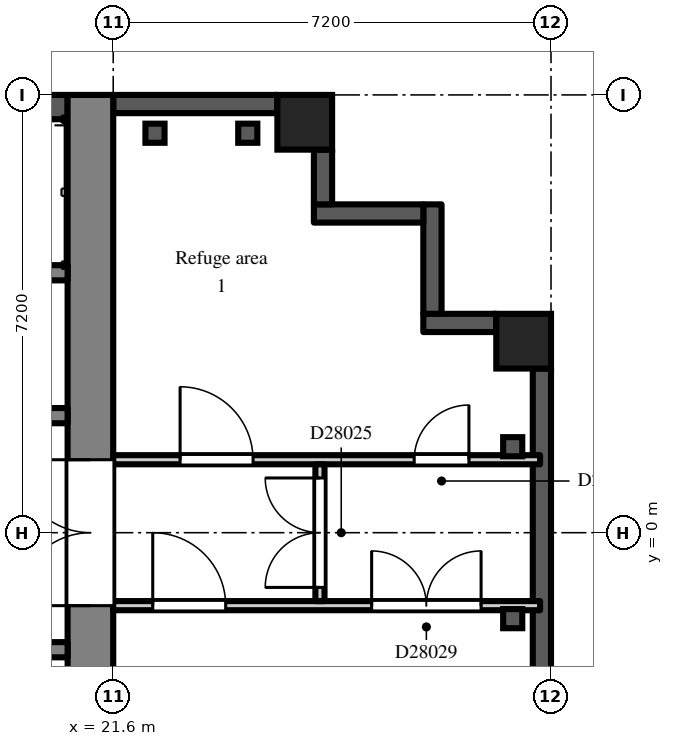
"""IFC4 building model, lengths in metres.
Left out: names, types, materials, properties, quantities, classifications, styles, units other than length and angle.
Written with IfcOpenShell. Run it as: python <this file> out.ifc"""

import sys

from ifc_helpers import new_model, si_unit, direction, frame, frame_2d, origin, origin_2d, place, context, subcontext, project, spatial, rectangle, extrude, element, fill, save


model = new_model("IFC4")
c1 = context("Model", 3, precision=1e-05, world=origin(), true_north=direction((0.0, 1.0)))
c2 = subcontext(c1, "Body", "Model", "MODEL_VIEW")
j1 = project(units=[si_unit("LENGTHUNIT", "METRE"), si_unit("PLANEANGLEUNIT", "RADIAN")], contexts=[c1])
p1 = place(None, origin())
s1 = spatial("IfcSite", under=j1, at=p1, CompositionType="ELEMENT")
p2 = place(p1, origin())
s2 = spatial("IfcBuilding", under=s1, at=p2, CompositionType="ELEMENT")
p3 = place(p2, frame((0.0, 0.0, 194.7)))
s3 = spatial("IfcBuildingStorey", under=s2, at=p3, CompositionType="ELEMENT", Elevation=194.7)
for number, where, z_axis, x_axis in (
    (1, (24.75, 6.75, 0.0), (0.0, 0.0, 1.0), (1.0, 0.0, 0.0)),
    (2, (28.35, 3.15, 0.0), (0.0, 0.0, 1.0), (1.0, 0.0, 0.0)),
):
    element("IfcColumn", number, at=place(p3, frame(where, z_axis=z_axis, x_axis=x_axis)), inside=s3, PredefinedType="COLUMN", context=c2, shape_type="SweptSolid", body=[
        extrude(rectangle(XDim=0.9, YDim=0.9, at=origin_2d()), origin(), (0.0, 0.0, 1.0), 4.2),
    ])
p4 = place(p3, frame((28.65, -2.7, 0.0), z_axis=(0.0, 0.0, 1.0), x_axis=(0.0, 1.0, 0.0)))
e3 = element("IfcWall", 3, at=p4, inside=s3, PredefinedType="SOLIDWALL", context=c2, shape_type="SweptSolid", body=[
    extrude(rectangle(XDim=5.4, YDim=0.3, at=frame_2d((2.7, 0.0))), origin(), (0.0, 0.0, 1.0), 3.5),
])
p5 = place(p3, frame((27.9, 3.45, 0.0), z_axis=(0.0, 0.0, 1.0), x_axis=(-1.0, 0.0, 0.0)))
e4 = element("IfcWall", 4, at=p5, inside=s3, PredefinedType="SOLIDWALL", context=c2, shape_type="SweptSolid", body=[
    extrude(rectangle(XDim=1.2, YDim=0.3, at=frame_2d((0.6, 0.0))), origin(), (0.0, 0.0, 1.0), 3.8),
])
p6 = place(p3, frame((26.85, 3.6, 0.0), z_axis=(0.0, 0.0, 1.0), x_axis=(0.0, 1.0, 0.0)))
e5 = element("IfcWall", 5, at=p6, inside=s3, PredefinedType="SOLIDWALL", context=c2, shape_type="SweptSolid", body=[
    extrude(rectangle(XDim=1.8, YDim=0.3, at=frame_2d((0.9, 0.0))), origin(), (0.0, 0.0, 1.0), 3.8),
])
p7 = place(p3, frame((26.7, 5.25, 0.0), z_axis=(0.0, 0.0, 1.0), x_axis=(-1.0, 0.0, 0.0)))
e6 = element("IfcWall", 6, at=p7, inside=s3, PredefinedType="SOLIDWALL", context=c2, shape_type="SweptSolid", body=[
    extrude(rectangle(XDim=1.8, YDim=0.3, at=frame_2d((0.9, 0.0))), origin(), (0.0, 0.0, 1.0), 3.8),
])
p8 = place(p3, frame((25.05, 5.4, 0.0), z_axis=(0.0, 0.0, 1.0), x_axis=(0.0, 1.0, 0.0)))
e7 = element("IfcWall", 7, at=p8, inside=s3, PredefinedType="SOLIDWALL", context=c2, shape_type="SweptSolid", body=[
    extrude(rectangle(XDim=0.9, YDim=0.3, at=frame_2d((0.45, 0.0))), origin(), (0.0, 0.0, 1.0), 3.8),
])
p9 = place(p3, frame((24.3, 7.05, 0.0), z_axis=(0.0, 0.0, 1.0), x_axis=(-1.0, 0.0, 0.0)))
e8 = element("IfcWall", 8, at=p9, inside=s3, PredefinedType="SOLIDWALL", context=c2, shape_type="SweptSolid", body=[
    extrude(rectangle(XDim=2.7, YDim=0.3, at=frame_2d((1.35, 0.0))), origin(), (0.0, 0.0, 1.0), 3.5),
])
p10 = place(p3, frame((21.225, -7.2, 0.0), z_axis=(0.0, 0.0, 1.0), x_axis=(0.0, 1.0, 0.0)))
e9 = element("IfcWall", 9, at=p10, inside=s3, PredefinedType="SHEAR", context=c2, shape_type="SweptSolid", body=[
    extrude(rectangle(XDim=14.4, YDim=0.75, at=frame_2d((7.2, 0.0))), origin(), (0.0, 0.0, 1.0), 3.8),
])
p11 = place(p10, frame((6.0, 0.0, 0.0)))
e10 = element("IfcOpeningElement", 10, at=p11, cuts=e9, PredefinedType="OPENING", context=c2, shape_type="SweptSolid", body=[
    extrude(rectangle(XDim=2.4, YDim=2.2, at=frame_2d((1.2, 1.1))), frame((0.0, 0.385, 0.0), z_axis=(0.0, -1.0, 0.0), x_axis=(1.0, 0.0, 0.0)), (0.0, 0.0, 1.0), 0.77),
])
p12 = place(p3, frame((7.9, 7.0, 0.0), z_axis=(0.0, 0.0, 1.0), x_axis=(1.0, 0.0, 0.0)))
e11 = element("IfcWall", 11, at=p12, inside=s3, PredefinedType="SHEAR", context=c2, shape_type="SweptSolid", body=[
    extrude(rectangle(XDim=12.95, YDim=0.4, at=frame_2d((6.475, 0.0))), origin(), (0.0, 0.0, 1.0), 3.8),
])
p13 = place(p3, frame((7.9, 1.925, 0.0), z_axis=(0.0, 0.0, 1.0), x_axis=(1.0, 0.0, 0.0)))
e12 = element("IfcWall", 12, at=p13, inside=s3, PredefinedType="SHEAR", context=c2, shape_type="SweptSolid", body=[
    extrude(rectangle(XDim=12.95, YDim=0.25, at=frame_2d((6.475, 0.0))), origin(), (0.0, 0.0, 1.0), 3.8),
])
p14 = place(p13, frame((4.825, 0.0, 0.0)))
e13 = element("IfcOpeningElement", 13, at=p14, cuts=e12, PredefinedType="OPENING", context=c2, shape_type="SweptSolid", body=[
    extrude(rectangle(XDim=1.1, YDim=2.1, at=frame_2d((0.55, 1.05))), frame((0.0, 0.135, 0.0), z_axis=(0.0, -1.0, 0.0), x_axis=(1.0, 0.0, 0.0)), (0.0, 0.0, 1.0), 0.27),
])
p15 = place(p13, frame((7.025, 0.0, 0.0)))
e14 = element("IfcOpeningElement", 14, at=p15, cuts=e12, PredefinedType="OPENING", context=c2, shape_type="SweptSolid", body=[
    extrude(rectangle(XDim=1.1, YDim=2.1, at=frame_2d((0.55, 1.05))), frame((0.0, 0.135, 0.0), z_axis=(0.0, -1.0, 0.0), x_axis=(1.0, 0.0, 0.0)), (0.0, 0.0, 1.0), 0.27),
])
p16 = place(p13, frame((9.225, 0.0, 0.0)))
e15 = element("IfcOpeningElement", 15, at=p16, cuts=e12, PredefinedType="OPENING", context=c2, shape_type="SweptSolid", body=[
    extrude(rectangle(XDim=1.1, YDim=2.1, at=frame_2d((0.55, 1.05))), frame((0.0, 0.135, 0.0), z_axis=(0.0, -1.0, 0.0), x_axis=(1.0, 0.0, 0.0)), (0.0, 0.0, 1.0), 0.27),
])
p17 = place(p13, frame((0.525, 0.0, 0.0)))
e16 = element("IfcOpeningElement", 16, at=p17, cuts=e12, PredefinedType="OPENING", context=c2, shape_type="SweptSolid", body=[
    extrude(rectangle(XDim=0.9, YDim=2.1, at=frame_2d((0.45, 1.05))), frame((0.0, 0.135, 0.0), z_axis=(0.0, -1.0, 0.0), x_axis=(1.0, 0.0, 0.0)), (0.0, 0.0, 1.0), 0.27),
])
p18 = place(p13, frame((2.625, 0.0, 0.0)))
e17 = element("IfcOpeningElement", 17, at=p18, cuts=e12, PredefinedType="OPENING", context=c2, shape_type="SweptSolid", body=[
    extrude(rectangle(XDim=1.1, YDim=2.1, at=frame_2d((0.55, 1.05))), frame((0.0, 0.135, 0.0), z_axis=(0.0, -1.0, 0.0), x_axis=(1.0, 0.0, 0.0)), (0.0, 0.0, 1.0), 0.27),
])
p19 = place(p13, frame((11.525, 0.0, 0.0)))
e18 = element("IfcOpeningElement", 18, at=p19, cuts=e12, PredefinedType="OPENING", context=c2, shape_type="SweptSolid", body=[
    extrude(rectangle(XDim=0.9, YDim=2.1, at=frame_2d((0.45, 1.05))), frame((0.0, 0.135, 0.0), z_axis=(0.0, -1.0, 0.0), x_axis=(1.0, 0.0, 0.0)), (0.0, 0.0, 1.0), 0.27),
])
p20 = place(p3, frame((12.3, 4.275, 0.0), z_axis=(0.0, 0.0, 1.0), x_axis=(1.0, 0.0, 0.0)))
e19 = element("IfcWall", 19, at=p20, inside=s3, PredefinedType="SHEAR", context=c2, shape_type="SweptSolid", body=[
    extrude(rectangle(XDim=8.55, YDim=0.25, at=frame_2d((4.275, 0.0))), origin(), (0.0, 0.0, 1.0), 3.8),
])
p21 = place(p3, frame((7.9, -1.925, 0.0), z_axis=(0.0, 0.0, 1.0), x_axis=(1.0, 0.0, 0.0)))
e20 = element("IfcWall", 20, at=p21, inside=s3, PredefinedType="SHEAR", context=c2, shape_type="SweptSolid", body=[
    extrude(rectangle(XDim=12.95, YDim=0.25, at=frame_2d((6.475, 0.0))), origin(), (0.0, 0.0, 1.0), 3.8),
])
p22 = place(p21, frame((0.525, 0.0, 0.0)))
e21 = element("IfcOpeningElement", 21, at=p22, cuts=e20, PredefinedType="OPENING", context=c2, shape_type="SweptSolid", body=[
    extrude(rectangle(XDim=0.9, YDim=2.1, at=frame_2d((0.45, 1.05))), frame((0.0, 0.135, 0.0), z_axis=(0.0, -1.0, 0.0), x_axis=(1.0, 0.0, 0.0)), (0.0, 0.0, 1.0), 0.27),
])
p23 = place(p21, frame((2.625, 0.0, 0.0)))
e22 = element("IfcOpeningElement", 22, at=p23, cuts=e20, PredefinedType="OPENING", context=c2, shape_type="SweptSolid", body=[
    extrude(rectangle(XDim=1.1, YDim=2.1, at=frame_2d((0.55, 1.05))), frame((0.0, 0.135, 0.0), z_axis=(0.0, -1.0, 0.0), x_axis=(1.0, 0.0, 0.0)), (0.0, 0.0, 1.0), 0.27),
])
p24 = place(p21, frame((4.925, 0.0, 0.0)))
e23 = element("IfcOpeningElement", 23, at=p24, cuts=e20, PredefinedType="OPENING", context=c2, shape_type="SweptSolid", body=[
    extrude(rectangle(XDim=0.9, YDim=2.1, at=frame_2d((0.45, 1.05))), frame((0.0, 0.135, 0.0), z_axis=(0.0, -1.0, 0.0), x_axis=(1.0, 0.0, 0.0)), (0.0, 0.0, 1.0), 0.27),
])
p25 = place(p21, frame((8.225, 0.0, 0.0)))
e24 = element("IfcOpeningElement", 24, at=p25, cuts=e20, PredefinedType="OPENING", context=c2, shape_type="SweptSolid", body=[
    extrude(rectangle(XDim=0.9, YDim=2.1, at=frame_2d((0.45, 1.05))), frame((0.0, 0.135, 0.0), z_axis=(0.0, -1.0, 0.0), x_axis=(1.0, 0.0, 0.0)), (0.0, 0.0, 1.0), 0.27),
])
p26 = place(p21, frame((11.525, 0.0, 0.0)))
e25 = element("IfcOpeningElement", 25, at=p26, cuts=e20, PredefinedType="OPENING", context=c2, shape_type="SweptSolid", body=[
    extrude(rectangle(XDim=0.9, YDim=2.1, at=frame_2d((0.45, 1.05))), frame((0.0, 0.135, 0.0), z_axis=(0.0, -1.0, 0.0), x_axis=(1.0, 0.0, 0.0)), (0.0, 0.0, 1.0), 0.27),
])
p27 = place(p3, frame((21.6, -1.2, 0.0), z_axis=(0.0, 0.0, 1.0), x_axis=(1.0, 0.0, 0.0)))
e26 = element("IfcWall", 26, at=p27, inside=s3, PredefinedType="PARTITIONING", context=c2, shape_type="SweptSolid", body=[
    extrude(rectangle(XDim=7.02, YDim=0.15, at=frame_2d((3.51, 0.0))), origin(), (0.0, 0.0, 1.0), 3.8),
])
p28 = place(p27, frame((0.65, 0.0, 0.0)))
e27 = element("IfcOpeningElement", 27, at=p28, cuts=e26, PredefinedType="OPENING", context=c2, shape_type="SweptSolid", body=[
    extrude(rectangle(XDim=1.2, YDim=2.1, at=frame_2d((0.6, 1.05))), frame((0.0, 0.085, 0.0), z_axis=(0.0, -1.0, 0.0), x_axis=(1.0, 0.0, 0.0)), (0.0, 0.0, 1.0), 0.17),
])
p29 = place(p27, frame((4.25, 0.0, 0.0)))
e28 = element("IfcOpeningElement", 28, at=p29, cuts=e26, PredefinedType="OPENING", context=c2, shape_type="SweptSolid", body=[
    extrude(rectangle(XDim=1.8, YDim=2.1, at=frame_2d((0.9, 1.05))), frame((0.0, 0.085, 0.0), z_axis=(0.0, -1.0, 0.0), x_axis=(1.0, 0.0, 0.0)), (0.0, 0.0, 1.0), 0.17),
])
p30 = place(p3, frame((21.6, 1.2, 0.0), z_axis=(0.0, 0.0, 1.0), x_axis=(1.0, 0.0, 0.0)))
e29 = element("IfcWall", 29, at=p30, inside=s3, PredefinedType="PARTITIONING", context=c2, shape_type="SweptSolid", body=[
    extrude(rectangle(XDim=7.02, YDim=0.15, at=frame_2d((3.51, 0.0))), origin(), (0.0, 0.0, 1.0), 3.8),
])
p31 = place(p30, frame((1.1, 0.0, 0.0)))
e30 = element("IfcOpeningElement", 30, at=p31, cuts=e29, PredefinedType="OPENING", context=c2, shape_type="SweptSolid", body=[
    extrude(rectangle(XDim=1.2, YDim=2.1, at=frame_2d((0.6, 1.05))), frame((0.0, 0.085, 0.0), z_axis=(0.0, -1.0, 0.0), x_axis=(1.0, 0.0, 0.0)), (0.0, 0.0, 1.0), 0.17),
])
p32 = place(p30, frame((4.95, 0.0, 0.0)))
e31 = element("IfcOpeningElement", 31, at=p32, cuts=e29, PredefinedType="OPENING", context=c2, shape_type="SweptSolid", body=[
    extrude(rectangle(XDim=0.9, YDim=2.1, at=frame_2d((0.45, 1.05))), frame((0.0, 0.085, 0.0), z_axis=(0.0, -1.0, 0.0), x_axis=(1.0, 0.0, 0.0)), (0.0, 0.0, 1.0), 0.17),
])
p33 = place(p3, frame((25.0, -1.125, 0.0), z_axis=(0.0, 0.0, 1.0), x_axis=(0.0, 1.0, 0.0)))
e32 = element("IfcWall", 32, at=p33, inside=s3, PredefinedType="PARTITIONING", context=c2, shape_type="SweptSolid", body=[
    extrude(rectangle(XDim=2.25, YDim=0.15, at=frame_2d((1.125, 0.0))), origin(), (0.0, 0.0, 1.0), 3.8),
])
p34 = place(p33, frame((0.225, 0.0, 0.0)))
e33 = element("IfcOpeningElement", 33, at=p34, cuts=e32, PredefinedType="OPENING", context=c2, shape_type="SweptSolid", body=[
    extrude(rectangle(XDim=1.8, YDim=2.1, at=frame_2d((0.9, 1.05))), frame((0.0, 0.085, 0.0), z_axis=(0.0, -1.0, 0.0), x_axis=(1.0, 0.0, 0.0)), (0.0, 0.0, 1.0), 0.17),
])
p35 = place(p11, origin())
e34 = element("IfcDoor", 34, at=p35, inside=s3, OperationType="DOUBLE_DOOR_DOUBLE_SWING", PredefinedType="DOOR", context=c2, shape_type="SweptSolid", body=[
    extrude(rectangle(XDim=2.4, YDim=2.2, at=frame_2d((1.2, 1.1))), frame((0.0, 0.025, 0.0), z_axis=(0.0, -1.0, 0.0), x_axis=(1.0, 0.0, 0.0)), (0.0, 0.0, 1.0), 0.05),
])
fill(e10, e34)
p36 = place(p34, origin())
e35 = element("IfcDoor", 35, at=p36, inside=s3, OperationType="DOUBLE_DOOR_DOUBLE_SWING", PredefinedType="DOOR", context=c2, shape_type="SweptSolid", body=[
    extrude(rectangle(XDim=1.8, YDim=2.1, at=frame_2d((0.9, 1.05))), frame((0.0, 0.025, 0.0), z_axis=(0.0, -1.0, 0.0), x_axis=(1.0, 0.0, 0.0)), (0.0, 0.0, 1.0), 0.05),
])
fill(e33, e35)
p37 = place(p31, origin())
e36 = element("IfcDoor", 36, at=p37, inside=s3, OperationType="SINGLE_SWING_LEFT", PredefinedType="DOOR", context=c2, shape_type="SweptSolid", body=[
    extrude(rectangle(XDim=1.2, YDim=2.1, at=frame_2d((0.6, 1.05))), frame((0.0, 0.025, 0.0), z_axis=(0.0, -1.0, 0.0), x_axis=(1.0, 0.0, 0.0)), (0.0, 0.0, 1.0), 0.05),
])
fill(e30, e36)
p38 = place(p32, origin())
e37 = element("IfcDoor", 37, at=p38, inside=s3, OperationType="SINGLE_SWING_RIGHT", PredefinedType="DOOR", context=c2, shape_type="SweptSolid", body=[
    extrude(rectangle(XDim=0.9, YDim=2.1, at=frame_2d((0.45, 1.05))), frame((0.0, 0.025, 0.0), z_axis=(0.0, -1.0, 0.0), x_axis=(1.0, 0.0, 0.0)), (0.0, 0.0, 1.0), 0.05),
])
fill(e31, e37)
p39 = place(p28, origin())
e38 = element("IfcDoor", 38, at=p39, inside=s3, OperationType="SINGLE_SWING_LEFT", PredefinedType="DOOR", context=c2, shape_type="SweptSolid", body=[
    extrude(rectangle(XDim=1.2, YDim=2.1, at=frame_2d((0.6, 1.05))), frame((0.0, 0.025, 0.0), z_axis=(0.0, -1.0, 0.0), x_axis=(1.0, 0.0, 0.0)), (0.0, 0.0, 1.0), 0.05),
])
fill(e27, e38)
p40 = place(p29, origin())
e39 = element("IfcDoor", 39, at=p40, inside=s3, OperationType="DOUBLE_DOOR_DOUBLE_SWING", PredefinedType="DOOR", context=c2, shape_type="SweptSolid", body=[
    extrude(rectangle(XDim=1.8, YDim=2.1, at=frame_2d((0.9, 1.05))), frame((0.0, 0.025, 0.0), z_axis=(0.0, -1.0, 0.0), x_axis=(1.0, 0.0, 0.0)), (0.0, 0.0, 1.0), 0.05),
])
fill(e28, e39)
save(model, sys.argv[1])
